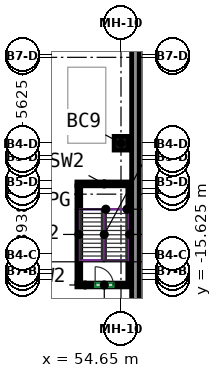
"""IFC4 building model, lengths in metres.
Left out: names, types, materials, properties, quantities, classifications, styles, units other than length and angle.
Written with IfcOpenShell. Run it as: python <this file> out.ifc"""

import sys

from ifc_helpers import new_model, si_unit, direction, frame, frame_2d, origin, origin_2d, place, context, subcontext, project, spatial, rectangle, extrude, source, transform, mapped, element, fill, save


model = new_model("IFC4")
c1 = context("Model", 3, precision=1e-05, world=origin(), true_north=direction((0.0, 1.0)))
c2 = subcontext(c1, "Body", "Model", "MODEL_VIEW")
j1 = project(units=[si_unit("LENGTHUNIT", "METRE"), si_unit("PLANEANGLEUNIT", "RADIAN")], contexts=[c1])
p1 = place(None, origin())
s1 = spatial("IfcSite", under=j1, at=p1, CompositionType="ELEMENT")
p2 = place(p1, origin())
s2 = spatial("IfcBuilding", under=s1, at=p2, CompositionType="ELEMENT")
p3 = place(p2, frame((0.0, 0.0, -4.5)))
s3 = spatial("IfcBuildingStorey", under=s2, at=p3, CompositionType="ELEMENT", Elevation=-4.5)
m1 = source(origin(), c2, "Body", "SweptSolid", [
    extrude(rectangle(XDim=0.9, YDim=0.9, at=origin_2d()), origin(), (0.0, 0.0, 1.0), 4.5),
])
p4 = place(p3, frame((54.65, -6.65, 0.0), z_axis=(0.0, 0.0, 1.0), x_axis=(1.0, 0.0, 0.0)))
e1 = element("IfcColumn", 1, at=p4, inside=s3, PredefinedType="COLUMN", context=c2, shape_type="MappedRepresentation", body=[
    mapped(m1, transform((0.0, 0.0, 0.0))),
])
m2 = source(origin(), c2, "Body", "SweptSolid", [
    extrude(rectangle(XDim=100.0, YDim=0.5, at=frame_2d((50.0, 0.0))), origin(), (0.0, 0.0, 1.0), 4.5),
])
p5 = place(p3, frame((55.6, -43.35, 0.0), z_axis=(0.0, 0.0, 1.0), x_axis=(0.0, 1.0, 0.0)))
e2 = element("IfcWall", 2, at=p5, inside=s3, PredefinedType="SOLIDWALL", context=c2, shape_type="MappedRepresentation", body=[
    mapped(m2, transform((0.0, 0.0, 0.0))),
])
m3 = source(origin(), c2, "Body", "SweptSolid", [
    extrude(rectangle(XDim=3.6, YDim=0.25, at=frame_2d((1.8, 0.0))), origin(), (0.0, 0.0, 1.0), 4.09),
])
p6 = place(p3, frame((51.75, -15.975, 0.0), z_axis=(0.0, 0.0, 1.0), x_axis=(1.0, 0.0, 0.0)))
e3 = element("IfcWall", 3, at=p6, inside=s3, PredefinedType="SHEAR", context=c2, shape_type="MappedRepresentation", body=[
    mapped(m3, transform((0.0, 0.0, 0.0))),
])
p7 = place(p6, frame((1.2, 0.0, 0.0)))
e4 = element("IfcOpeningElement", 4, at=p7, cuts=e3, PredefinedType="OPENING", context=c2, shape_type="SweptSolid", body=[
    extrude(rectangle(XDim=1.2, YDim=2.1, at=frame_2d((0.6, 1.05))), frame((0.0, 0.135, 0.0), z_axis=(0.0, -1.0, 0.0), x_axis=(1.0, 0.0, 0.0)), (0.0, 0.0, 1.0), 0.27),
])
p8 = place(p3, frame((51.75, -9.325, 0.0), z_axis=(0.0, 0.0, 1.0), x_axis=(1.0, 0.0, 0.0)))
e5 = element("IfcWall", 5, at=p8, inside=s3, PredefinedType="SHEAR", context=c2, shape_type="MappedRepresentation", body=[
    mapped(m3, transform((0.0, 0.0, 0.0))),
])
m4 = source(origin(), c2, "Body", "SweptSolid", [
    extrude(rectangle(XDim=6.4, YDim=0.25, at=frame_2d((3.2, 0.0))), origin(), (0.0, 0.0, 1.0), 4.09),
])
for number, where, z_axis, x_axis in (
    (6, (51.875, -15.85, 0.0), (0.0, 0.0, 1.0), (0.0, 1.0, 0.0)),
    (7, (55.225, -15.85, 0.0), (0.0, 0.0, 1.0), (0.0, 1.0, 0.0)),
):
    element("IfcWall", number, at=place(p3, frame(where, z_axis=z_axis, x_axis=x_axis)), inside=s3, PredefinedType="SHEAR", context=c2, shape_type="MappedRepresentation", body=[
        mapped(m4, transform((0.0, 0.0, 0.0))),
    ])
p9 = place(p7, origin())
e8 = element("IfcDoor", 8, at=p9, inside=s3, OperationType="SINGLE_SWING_LEFT", PredefinedType="DOOR", context=c2, shape_type="SweptSolid", body=[
    extrude(rectangle(XDim=1.2, YDim=2.1, at=frame_2d((0.6, 1.05))), frame((0.0, 0.025, 0.0), z_axis=(0.0, -1.0, 0.0), x_axis=(1.0, 0.0, 0.0)), (0.0, 0.0, 1.0), 0.05),
])
fill(e4, e8)
save(model, sys.argv[1])
